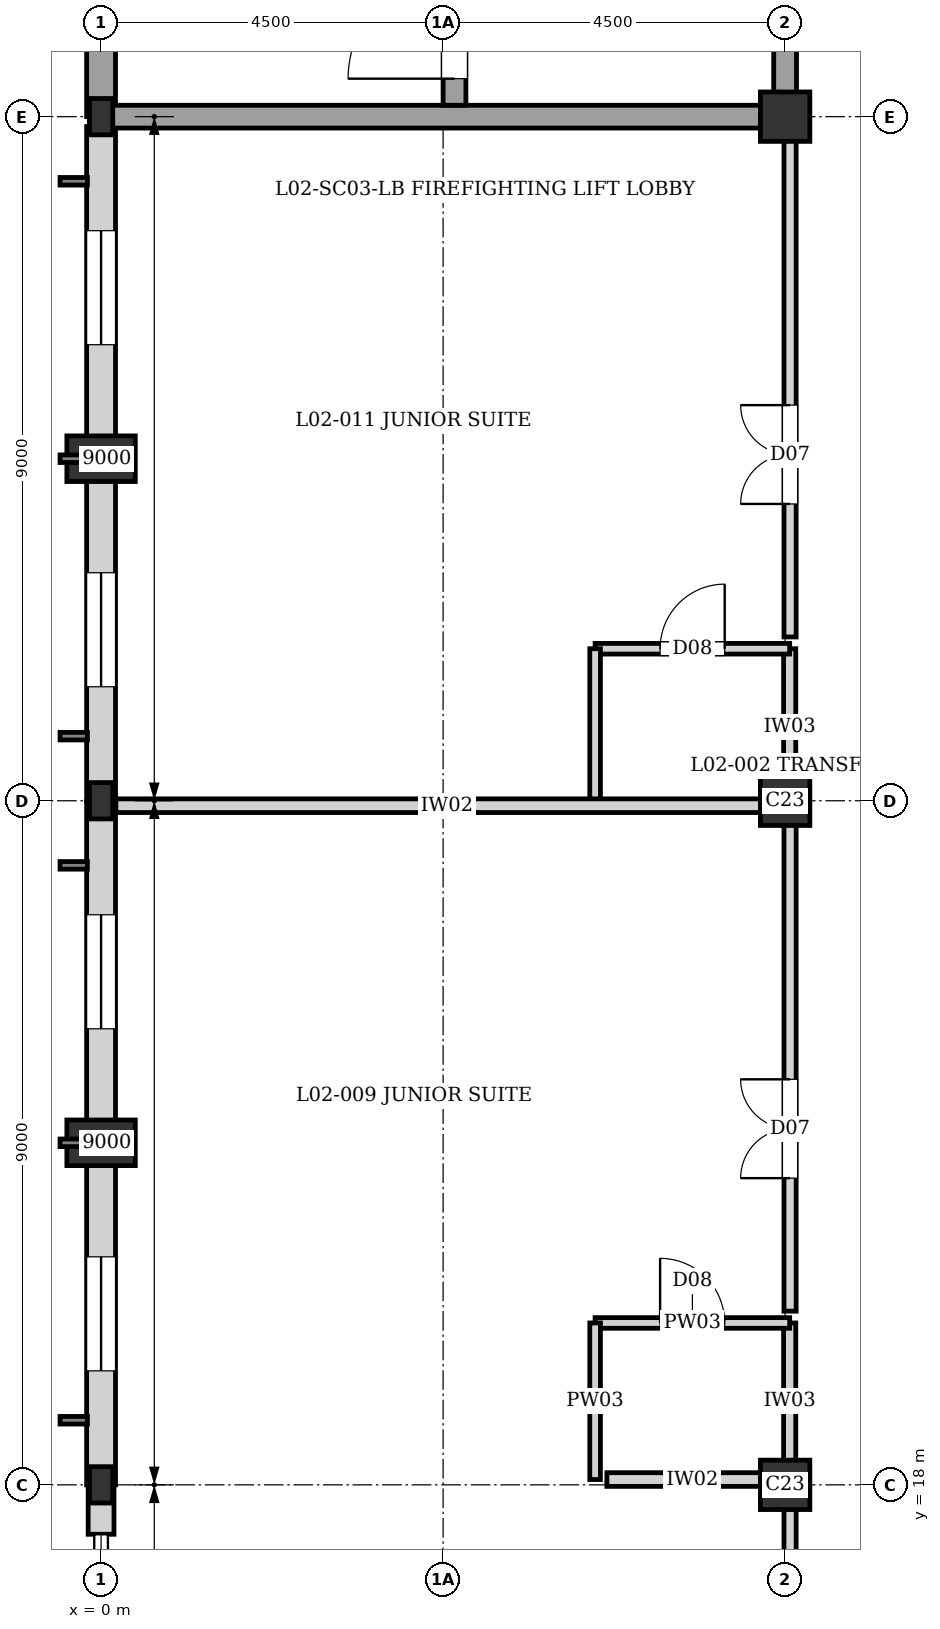
"""IFC4 building model, lengths in metres.
Left out: names, types, materials, properties, quantities, classifications, styles, units other than length and angle.
Written with IfcOpenShell. Run it as: python <this file> out.ifc"""

import sys

from ifc_helpers import new_model, si_unit, direction, frame, frame_2d, origin, origin_2d, place, context, subcontext, project, spatial, rectangle, i_section, extrude, element, fill, save


model = new_model("IFC4")
c1 = context("Model", 3, precision=1e-05, world=origin(), true_north=direction((0.0, 1.0)))
c2 = subcontext(c1, "Body", "Model", "MODEL_VIEW")
j1 = project(units=[si_unit("LENGTHUNIT", "METRE"), si_unit("PLANEANGLEUNIT", "RADIAN")], contexts=[c1])
p1 = place(None, origin())
s1 = spatial("IfcSite", under=j1, at=p1, CompositionType="ELEMENT")
p2 = place(p1, origin())
s2 = spatial("IfcBuilding", under=s1, at=p2, CompositionType="ELEMENT")
p3 = place(p2, frame((0.0, 0.0, 8.16)))
s3 = spatial("IfcBuildingStorey", under=s2, at=p3, CompositionType="ELEMENT", Elevation=8.16)
for number, where, z_axis, x_axis in (
    (1, (0.0, 18.0, 0.0), (0.0, 0.0, 1.0), (1.0, 0.0, 0.0)),
    (2, (0.0, 27.0, 0.0), (0.0, 0.0, 1.0), (1.0, 0.0, 0.0)),
    (3, (0.0, 36.0, 0.0), (0.0, 0.0, 1.0), (1.0, 0.0, 0.0)),
):
    element("IfcColumn", number, at=place(p3, frame(where, z_axis=z_axis, x_axis=x_axis)), inside=s3, PredefinedType="COLUMN", context=c2, shape_type="SweptSolid", body=[
        extrude(i_section(OverallWidth=0.307, OverallDepth=0.478, WebThickness=0.021, FlangeThickness=0.04, at=origin_2d()), origin(), (0.0, 0.0, 1.0), 3.36),
    ])
for number, where, z_axis, x_axis in (
    (4, (9.0, 18.0, 0.0), (0.0, 0.0, 1.0), (1.0, 0.0, 0.0)),
    (5, (9.0, 27.0, 0.0), (0.0, 0.0, 1.0), (1.0, 0.0, 0.0)),
    (6, (9.0, 36.0, 0.0), (0.0, 0.0, 1.0), (1.0, 0.0, 0.0)),
):
    element("IfcColumn", number, at=place(p3, frame(where, z_axis=z_axis, x_axis=x_axis)), inside=s3, PredefinedType="COLUMN", context=c2, shape_type="SweptSolid", body=[
        extrude(rectangle(XDim=0.65, YDim=0.65, at=origin_2d()), origin(), (0.0, 0.0, 1.0), 3.36),
    ])
for number, where, z_axis, x_axis in (
    (7, (0.0, 22.5, 0.0), (0.0, 0.0, 1.0), (0.0, 1.0, 0.0)),
    (8, (0.0, 31.5, 0.0), (0.0, 0.0, 1.0), (0.0, 1.0, 0.0)),
):
    element("IfcColumn", number, at=place(p3, frame(where, z_axis=z_axis, x_axis=x_axis)), inside=s3, PredefinedType="PILASTER", context=c2, shape_type="SweptSolid", body=[
        extrude(rectangle(XDim=0.6, YDim=0.9, at=origin_2d()), origin(), (0.0, 0.0, 1.0), 3.36),
    ])
p4 = place(p3, frame((0.0, 17.35, 0.0), z_axis=(0.0, 0.0, 1.0), x_axis=(0.0, 1.0, 0.0)))
e9 = element("IfcWall", 9, at=p4, inside=s3, PredefinedType="SOLIDWALL", context=c2, shape_type="SweptSolid", body=[
    extrude(rectangle(XDim=0.65, YDim=0.34, at=frame_2d((0.325, 0.0))), origin(), (0.0, 0.0, 1.0), 2.74),
])
p5 = place(p3, frame((0.0, 18.0, 0.0), z_axis=(0.0, 0.0, 1.0), x_axis=(0.0, 1.0, 0.0)))
e10 = element("IfcWall", 10, at=p5, inside=s3, PredefinedType="SOLIDWALL", context=c2, shape_type="SweptSolid", body=[
    extrude(rectangle(XDim=9.0, YDim=0.38, at=frame_2d((4.5, 0.0))), origin(), (0.0, 0.0, 1.0), 2.7),
])
p6 = place(p5, frame((1.5, 0.0, 0.35)))
e11 = element("IfcOpeningElement", 11, at=p6, cuts=e10, PredefinedType="OPENING", context=c2, shape_type="SweptSolid", body=[
    extrude(rectangle(XDim=1.5, YDim=1.8, at=frame_2d((0.75, 0.9))), frame((0.0, 0.2, 0.0), z_axis=(0.0, -1.0, 0.0), x_axis=(1.0, 0.0, 0.0)), (0.0, 0.0, 1.0), 0.4),
])
p7 = place(p5, frame((6.0, 0.0, 0.35)))
e12 = element("IfcOpeningElement", 12, at=p7, cuts=e10, PredefinedType="OPENING", context=c2, shape_type="SweptSolid", body=[
    extrude(rectangle(XDim=1.5, YDim=1.8, at=frame_2d((0.75, 0.9))), frame((0.0, 0.2, 0.0), z_axis=(0.0, -1.0, 0.0), x_axis=(1.0, 0.0, 0.0)), (0.0, 0.0, 1.0), 0.4),
])
p8 = place(p3, frame((0.0, 27.0, 0.0), z_axis=(0.0, 0.0, 1.0), x_axis=(0.0, 1.0, 0.0)))
e13 = element("IfcWall", 13, at=p8, inside=s3, PredefinedType="SOLIDWALL", context=c2, shape_type="SweptSolid", body=[
    extrude(rectangle(XDim=8.87, YDim=0.38, at=frame_2d((4.435, 0.0))), origin(), (0.0, 0.0, 1.0), 3.14),
])
p9 = place(p8, frame((1.5, 0.0, 0.35)))
e14 = element("IfcOpeningElement", 14, at=p9, cuts=e13, PredefinedType="OPENING", context=c2, shape_type="SweptSolid", body=[
    extrude(rectangle(XDim=1.5, YDim=1.8, at=frame_2d((0.75, 0.9))), frame((0.0, 0.2, 0.0), z_axis=(0.0, -1.0, 0.0), x_axis=(1.0, 0.0, 0.0)), (0.0, 0.0, 1.0), 0.4),
])
p10 = place(p8, frame((6.0, 0.0, 0.35)))
e15 = element("IfcOpeningElement", 15, at=p10, cuts=e13, PredefinedType="OPENING", context=c2, shape_type="SweptSolid", body=[
    extrude(rectangle(XDim=1.5, YDim=1.8, at=frame_2d((0.75, 0.9))), frame((0.0, 0.2, 0.0), z_axis=(0.0, -1.0, 0.0), x_axis=(1.0, 0.0, 0.0)), (0.0, 0.0, 1.0), 0.4),
])
p11 = place(p3, frame((0.0, 36.0, 0.0), z_axis=(0.0, 0.0, 1.0), x_axis=(0.0, 1.0, 0.0)))
e16 = element("IfcWall", 16, at=p11, inside=s3, PredefinedType="SOLIDWALL", context=c2, shape_type="SweptSolid", body=[
    extrude(rectangle(XDim=9.0, YDim=0.38, at=frame_2d((4.5, 0.0))), origin(), (0.0, 0.0, 1.0), 3.14),
])
p12 = place(p3, frame((0.0, 36.0, 0.0), z_axis=(0.0, 0.0, 1.0), x_axis=(1.0, 0.0, 0.0)))
e17 = element("IfcWall", 17, at=p12, inside=s3, PredefinedType="SHEAR", context=c2, shape_type="SweptSolid", body=[
    extrude(rectangle(XDim=9.0, YDim=0.3, at=frame_2d((4.5, 0.0))), origin(), (0.0, 0.0, 1.0), 3.14),
])
p13 = place(p3, frame((9.0, 36.0, 0.0), z_axis=(0.0, 0.0, 1.0), x_axis=(0.0, 1.0, 0.0)))
e18 = element("IfcWall", 18, at=p13, inside=s3, PredefinedType="SHEAR", context=c2, shape_type="SweptSolid", body=[
    extrude(rectangle(XDim=9.0, YDim=0.3, at=frame_2d((4.5, 0.0))), origin(), (0.0, 0.0, 1.0), 3.14),
])
p14 = place(p13, frame((1.95, 0.0, 0.0)))
e19 = element("IfcOpeningElement", 19, at=p14, cuts=e18, PredefinedType="OPENING", context=c2, shape_type="SweptSolid", body=[
    extrude(rectangle(XDim=1.6, YDim=2.1, at=frame_2d((0.8, 1.05))), frame((0.0, 0.16, 0.0), z_axis=(0.0, -1.0, 0.0), x_axis=(1.0, 0.0, 0.0)), (0.0, 0.0, 1.0), 0.32),
])
p15 = place(p3, frame((4.65, 36.15, 0.0), z_axis=(0.0, 0.0, 1.0), x_axis=(0.0, 1.0, 0.0)))
e20 = element("IfcWall", 20, at=p15, inside=s3, PredefinedType="SHEAR", context=c2, shape_type="SweptSolid", body=[
    extrude(rectangle(XDim=8.7, YDim=0.3, at=frame_2d((4.35, 0.0))), origin(), (0.0, 0.0, 1.0), 3.14),
])
p16 = place(p15, frame((0.35, 0.0, 0.0)))
e21 = element("IfcOpeningElement", 21, at=p16, cuts=e20, PredefinedType="OPENING", context=c2, shape_type="SweptSolid", body=[
    extrude(rectangle(XDim=1.4, YDim=2.02, at=frame_2d((0.7, 1.01))), frame((0.0, 0.16, 0.0), z_axis=(0.0, -1.0, 0.0), x_axis=(1.0, 0.0, 0.0)), (0.0, 0.0, 1.0), 0.32),
])
p17 = place(p3, frame((9.06, 18.07, 0.0), z_axis=(0.0, 0.0, 1.0), x_axis=(0.0, 1.0, 0.0)))
e22 = element("IfcWall", 22, at=p17, inside=s3, PredefinedType="PARTITIONING", context=c2, shape_type="SweptSolid", body=[
    extrude(rectangle(XDim=2.06, YDim=0.16, at=frame_2d((1.03, 0.0))), origin(), (0.0, 0.0, 1.0), 2.81),
])
p18 = place(p3, frame((6.5, 20.13, 0.0), z_axis=(0.0, 0.0, 1.0), x_axis=(1.0, 0.0, 0.0)))
e23 = element("IfcWall", 23, at=p18, inside=s3, PredefinedType="PLUMBINGWALL", context=c2, shape_type="SweptSolid", body=[
    extrude(rectangle(XDim=2.56, YDim=0.14, at=frame_2d((1.28, 0.0))), origin(), (0.0, 0.0, 1.0), 3.14),
])
p19 = place(p18, frame((0.855, 0.0, 0.0)))
e24 = element("IfcOpeningElement", 24, at=p19, cuts=e23, PredefinedType="OPENING", context=c2, shape_type="SweptSolid", body=[
    extrude(rectangle(XDim=0.85, YDim=2.04, at=frame_2d((0.425, 1.02))), frame((0.0, 0.08, 0.0), z_axis=(0.0, -1.0, 0.0), x_axis=(1.0, 0.0, 0.0)), (0.0, 0.0, 1.0), 0.16),
])
p20 = place(p3, frame((6.5, 18.07, 0.0), z_axis=(0.0, 0.0, 1.0), x_axis=(0.0, 1.0, 0.0)))
e25 = element("IfcWall", 25, at=p20, inside=s3, PredefinedType="PLUMBINGWALL", context=c2, shape_type="SweptSolid", body=[
    extrude(rectangle(XDim=2.06, YDim=0.14, at=frame_2d((1.03, 0.0))), origin(), (0.0, 0.0, 1.0), 3.14),
])
p21 = place(p3, frame((9.06, 26.94, 0.0), z_axis=(0.0, 0.0, 1.0), x_axis=(0.0, 1.0, 0.0)))
e26 = element("IfcWall", 26, at=p21, inside=s3, PredefinedType="PARTITIONING", context=c2, shape_type="SweptSolid", body=[
    extrude(rectangle(XDim=2.06, YDim=0.16, at=frame_2d((1.03, 0.0))), origin(), (0.0, 0.0, 1.0), 2.77),
])
p22 = place(p3, frame((6.5, 29.0, 0.0), z_axis=(0.0, 0.0, 1.0), x_axis=(1.0, 0.0, 0.0)))
e27 = element("IfcWall", 27, at=p22, inside=s3, PredefinedType="PLUMBINGWALL", context=c2, shape_type="SweptSolid", body=[
    extrude(rectangle(XDim=2.56, YDim=0.14, at=frame_2d((1.28, 0.0))), origin(), (0.0, 0.0, 1.0), 3.14),
])
p23 = place(p22, frame((0.855, 0.0, 0.0)))
e28 = element("IfcOpeningElement", 28, at=p23, cuts=e27, PredefinedType="OPENING", context=c2, shape_type="SweptSolid", body=[
    extrude(rectangle(XDim=0.85, YDim=2.04, at=frame_2d((0.425, 1.02))), frame((0.0, 0.08, 0.0), z_axis=(0.0, -1.0, 0.0), x_axis=(1.0, 0.0, 0.0)), (0.0, 0.0, 1.0), 0.16),
])
p24 = place(p3, frame((6.5, 26.94, 0.0), z_axis=(0.0, 0.0, 1.0), x_axis=(0.0, 1.0, 0.0)))
e29 = element("IfcWall", 29, at=p24, inside=s3, PredefinedType="PLUMBINGWALL", context=c2, shape_type="SweptSolid", body=[
    extrude(rectangle(XDim=2.06, YDim=0.14, at=frame_2d((1.03, 0.0))), origin(), (0.0, 0.0, 1.0), 3.14),
])
p25 = place(p3, frame((0.195, 26.935, 0.0), z_axis=(0.0, 0.0, 1.0), x_axis=(1.0, 0.0, 0.0)))
e30 = element("IfcWall", 30, at=p25, inside=s3, PredefinedType="PARTITIONING", context=c2, shape_type="SweptSolid", body=[
    extrude(rectangle(XDim=8.71, YDim=0.18, at=frame_2d((4.355, 0.0))), origin(), (0.0, 0.0, 1.0), 2.81),
])
p26 = place(p3, frame((6.655, 18.07, 0.0), z_axis=(0.0, 0.0, 1.0), x_axis=(1.0, 0.0, 0.0)))
e31 = element("IfcWall", 31, at=p26, inside=s3, PredefinedType="PARTITIONING", context=c2, shape_type="SweptSolid", body=[
    extrude(rectangle(XDim=2.25, YDim=0.18, at=frame_2d((1.125, 0.0))), origin(), (0.0, 0.0, 1.0), 2.87),
])
p27 = place(p3, frame((9.065, 12.005, 0.0), z_axis=(0.0, 0.0, 1.0), x_axis=(0.0, 1.0, 0.0)))
e32 = element("IfcWall", 32, at=p27, inside=s3, PredefinedType="PARTITIONING", context=c2, shape_type="SweptSolid", body=[
    extrude(rectangle(XDim=5.97, YDim=0.16, at=frame_2d((2.985, 0.0))), origin(), (0.0, 0.0, 1.0), 2.41),
])
p28 = place(p27, frame((1.619, 0.0, 0.0)))
e33 = element("IfcOpeningElement", 33, at=p28, cuts=e32, PredefinedType="OPENING", context=c2, shape_type="SweptSolid", body=[
    extrude(rectangle(XDim=1.3, YDim=2.25, at=frame_2d((0.65, 1.125))), frame((0.0, 0.09, 0.0), z_axis=(0.0, -1.0, 0.0), x_axis=(1.0, 0.0, 0.0)), (0.0, 0.0, 1.0), 0.18),
])
p29 = place(p3, frame((9.065, 20.285, 0.0), z_axis=(0.0, 0.0, 1.0), x_axis=(0.0, 1.0, 0.0)))
e34 = element("IfcWall", 34, at=p29, inside=s3, PredefinedType="PARTITIONING", context=c2, shape_type="SweptSolid", body=[
    extrude(rectangle(XDim=6.495, YDim=0.16, at=frame_2d((3.248, 0.0))), origin(), (0.0, 0.0, 1.0), 2.81),
])
p30 = place(p29, frame((1.75, 0.0, 0.0)))
e35 = element("IfcOpeningElement", 35, at=p30, cuts=e34, PredefinedType="OPENING", context=c2, shape_type="SweptSolid", body=[
    extrude(rectangle(XDim=1.3, YDim=2.25, at=frame_2d((0.65, 1.125))), frame((0.0, 0.09, 0.0), z_axis=(0.0, -1.0, 0.0), x_axis=(1.0, 0.0, 0.0)), (0.0, 0.0, 1.0), 0.18),
])
p31 = place(p3, frame((9.065, 29.155, 0.0), z_axis=(0.0, 0.0, 1.0), x_axis=(0.0, 1.0, 0.0)))
e36 = element("IfcWall", 36, at=p31, inside=s3, PredefinedType="PARTITIONING", context=c2, shape_type="SweptSolid", body=[
    extrude(rectangle(XDim=6.69, YDim=0.16, at=frame_2d((3.345, 0.0))), origin(), (0.0, 0.0, 1.0), 2.77),
])
p32 = place(p31, frame((1.75, 0.0, 0.0)))
e37 = element("IfcOpeningElement", 37, at=p32, cuts=e36, PredefinedType="OPENING", context=c2, shape_type="SweptSolid", body=[
    extrude(rectangle(XDim=1.3, YDim=2.25, at=frame_2d((0.65, 1.125))), frame((0.0, 0.09, 0.0), z_axis=(0.0, -1.0, 0.0), x_axis=(1.0, 0.0, 0.0)), (0.0, 0.0, 1.0), 0.18),
])
p33 = place(p6, origin())
e38 = element("IfcWindow", 38, at=p33, inside=s3, PartitioningType="SINGLE_PANEL", PredefinedType="WINDOW", context=c2, shape_type="SweptSolid", body=[
    extrude(rectangle(XDim=1.5, YDim=1.8, at=frame_2d((0.75, 0.9))), frame((0.0, 0.03, 0.0), z_axis=(0.0, -1.0, 0.0), x_axis=(1.0, 0.0, 0.0)), (0.0, 0.0, 1.0), 0.06),
])
fill(e11, e38)
p34 = place(p7, origin())
e39 = element("IfcWindow", 39, at=p34, inside=s3, PartitioningType="SINGLE_PANEL", PredefinedType="WINDOW", context=c2, shape_type="SweptSolid", body=[
    extrude(rectangle(XDim=1.5, YDim=1.8, at=frame_2d((0.75, 0.9))), frame((0.0, 0.03, 0.0), z_axis=(0.0, -1.0, 0.0), x_axis=(1.0, 0.0, 0.0)), (0.0, 0.0, 1.0), 0.06),
])
fill(e12, e39)
p35 = place(p9, origin())
e40 = element("IfcWindow", 40, at=p35, inside=s3, PartitioningType="SINGLE_PANEL", PredefinedType="WINDOW", context=c2, shape_type="SweptSolid", body=[
    extrude(rectangle(XDim=1.5, YDim=1.8, at=frame_2d((0.75, 0.9))), frame((0.0, 0.03, 0.0), z_axis=(0.0, -1.0, 0.0), x_axis=(1.0, 0.0, 0.0)), (0.0, 0.0, 1.0), 0.06),
])
fill(e14, e40)
p36 = place(p10, origin())
e41 = element("IfcWindow", 41, at=p36, inside=s3, PartitioningType="SINGLE_PANEL", PredefinedType="WINDOW", context=c2, shape_type="SweptSolid", body=[
    extrude(rectangle(XDim=1.5, YDim=1.8, at=frame_2d((0.75, 0.9))), frame((0.0, 0.03, 0.0), z_axis=(0.0, -1.0, 0.0), x_axis=(1.0, 0.0, 0.0)), (0.0, 0.0, 1.0), 0.06),
])
fill(e15, e41)
p37 = place(p16, origin())
e42 = element("IfcDoor", 42, at=p37, inside=s3, OperationType="SINGLE_SWING_LEFT", PredefinedType="DOOR", context=c2, shape_type="SweptSolid", body=[
    extrude(rectangle(XDim=1.4, YDim=2.02, at=frame_2d((0.7, 1.01))), frame((0.0, 0.025, 0.0), z_axis=(0.0, -1.0, 0.0), x_axis=(1.0, 0.0, 0.0)), (0.0, 0.0, 1.0), 0.05),
])
fill(e21, e42)
p38 = place(p19, origin())
e43 = element("IfcDoor", 43, at=p38, inside=s3, OperationType="SINGLE_SWING_LEFT", PredefinedType="DOOR", context=c2, shape_type="SweptSolid", body=[
    extrude(rectangle(XDim=0.85, YDim=2.04, at=frame_2d((0.425, 1.02))), frame((0.0, 0.025, 0.0), z_axis=(0.0, -1.0, 0.0), x_axis=(1.0, 0.0, 0.0)), (0.0, 0.0, 1.0), 0.05),
])
fill(e24, e43)
p39 = place(p23, origin())
e44 = element("IfcDoor", 44, at=p39, inside=s3, OperationType="SINGLE_SWING_RIGHT", PredefinedType="DOOR", context=c2, shape_type="SweptSolid", body=[
    extrude(rectangle(XDim=0.85, YDim=2.04, at=frame_2d((0.425, 1.02))), frame((0.0, 0.025, 0.0), z_axis=(0.0, -1.0, 0.0), x_axis=(1.0, 0.0, 0.0)), (0.0, 0.0, 1.0), 0.05),
])
fill(e28, e44)
p40 = place(p30, origin())
e45 = element("IfcDoor", 45, at=p40, inside=s3, OperationType="DOUBLE_DOOR_SINGLE_SWING", PredefinedType="DOOR", context=c2, shape_type="SweptSolid", body=[
    extrude(rectangle(XDim=1.3, YDim=2.25, at=frame_2d((0.65, 1.125))), frame((0.0, 0.025, 0.0), z_axis=(0.0, -1.0, 0.0), x_axis=(1.0, 0.0, 0.0)), (0.0, 0.0, 1.0), 0.05),
])
fill(e35, e45)
p41 = place(p32, origin())
e46 = element("IfcDoor", 46, at=p41, inside=s3, OperationType="DOUBLE_DOOR_SINGLE_SWING", PredefinedType="DOOR", context=c2, shape_type="SweptSolid", body=[
    extrude(rectangle(XDim=1.3, YDim=2.25, at=frame_2d((0.65, 1.125))), frame((0.0, 0.025, 0.0), z_axis=(0.0, -1.0, 0.0), x_axis=(1.0, 0.0, 0.0)), (0.0, 0.0, 1.0), 0.05),
])
fill(e37, e46)
save(model, sys.argv[1])
